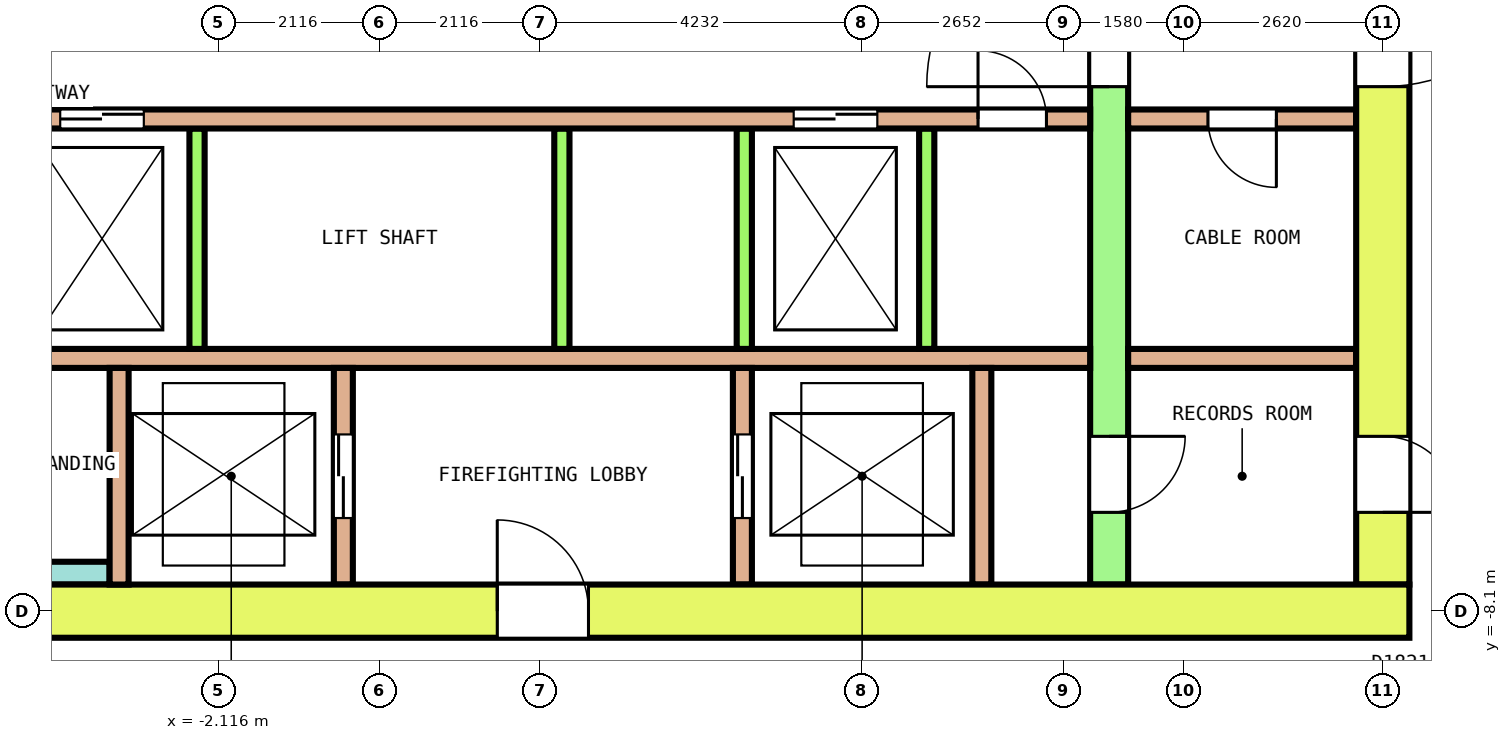
"""IFC4 building model, lengths in metres.
Left out: names, types, materials, properties, quantities, classifications, styles, units other than length and angle.
Written with IfcOpenShell. Run it as: python <this file> out.ifc"""

import sys

from ifc_helpers import new_model, si_unit, direction, frame, frame_2d, origin, place, context, subcontext, project, spatial, rectangle, extrude, element, fill, save


model = new_model("IFC4")
c1 = context("Model", 3, precision=1e-05, world=origin(), true_north=direction((0.0, 1.0)))
c2 = subcontext(c1, "Body", "Model", "MODEL_VIEW")
j1 = project(units=[si_unit("LENGTHUNIT", "METRE"), si_unit("PLANEANGLEUNIT", "RADIAN")], contexts=[c1])
p1 = place(None, origin())
s1 = spatial("IfcSite", under=j1, at=p1, CompositionType="ELEMENT")
p2 = place(p1, origin())
s2 = spatial("IfcBuilding", under=s1, at=p2, CompositionType="ELEMENT")
p3 = place(p2, frame((0.0, 0.0, 171.6)))
s3 = spatial("IfcBuildingStorey", under=s2, at=p3, CompositionType="ELEMENT", Elevation=171.6)
p4 = place(p3, frame((-13.55, -8.1, 0.0), z_axis=(0.0, 0.0, 1.0), x_axis=(1.0, 0.0, 0.0)))
e1 = element("IfcWall", 1, at=p4, inside=s3, PredefinedType="SHEAR", context=c2, shape_type="SweptSolid", body=[
    extrude(rectangle(XDim=27.1, YDim=0.7, at=frame_2d((13.55, 0.0))), origin(), (0.0, 0.0, 1.0), 4.1),
])
p5 = place(p4, frame((15.1, 0.0, 0.0)))
e2 = element("IfcOpeningElement", 2, at=p5, cuts=e1, PredefinedType="OPENING", context=c2, shape_type="SweptSolid", body=[
    extrude(rectangle(XDim=1.2, YDim=2.1, at=frame_2d((0.6, 1.05))), frame((0.0, 0.36, 0.0), z_axis=(0.0, -1.0, 0.0), x_axis=(1.0, 0.0, 0.0)), (0.0, 0.0, 1.0), 0.72),
])
p6 = place(p3, frame((13.2, -7.75, 0.0), z_axis=(0.0, 0.0, 1.0), x_axis=(0.0, 1.0, 0.0)))
e3 = element("IfcWall", 3, at=p6, inside=s3, PredefinedType="SHEAR", context=c2, shape_type="SweptSolid", body=[
    extrude(rectangle(XDim=15.5, YDim=0.7, at=frame_2d((7.75, 0.0))), origin(), (0.0, 0.0, 1.0), 4.1),
])
p7 = place(p6, frame((6.55, 0.0, 0.0)))
e4 = element("IfcOpeningElement", 4, at=p7, cuts=e3, PredefinedType="OPENING", context=c2, shape_type="SweptSolid", body=[
    extrude(rectangle(XDim=2.4, YDim=2.1, at=frame_2d((1.2, 1.05))), frame((0.0, 0.36, 0.0), z_axis=(0.0, -1.0, 0.0), x_axis=(1.0, 0.0, 0.0)), (0.0, 0.0, 1.0), 0.72),
])
p8 = place(p6, frame((13.45, 0.0, 0.0)))
e5 = element("IfcOpeningElement", 5, at=p8, cuts=e3, PredefinedType="OPENING", context=c2, shape_type="SweptSolid", body=[
    extrude(rectangle(XDim=1.2, YDim=2.1, at=frame_2d((0.6, 1.05))), frame((0.0, 0.36, 0.0), z_axis=(0.0, -1.0, 0.0), x_axis=(1.0, 0.0, 0.0)), (0.0, 0.0, 1.0), 0.72),
])
p9 = place(p6, frame((0.95, 0.0, 0.0)))
e6 = element("IfcOpeningElement", 6, at=p9, cuts=e3, PredefinedType="OPENING", context=c2, shape_type="SweptSolid", body=[
    extrude(rectangle(XDim=1.0, YDim=2.1, at=frame_2d((0.5, 1.05))), frame((0.0, 0.36, 0.0), z_axis=(0.0, -1.0, 0.0), x_axis=(1.0, 0.0, 0.0)), (0.0, 0.0, 1.0), 0.72),
])
p10 = place(p3, frame((9.6, -7.75, 0.0), z_axis=(0.0, 0.0, 1.0), x_axis=(0.0, 1.0, 0.0)))
e7 = element("IfcWall", 7, at=p10, inside=s3, PredefinedType="SHEAR", context=c2, shape_type="SweptSolid", body=[
    extrude(rectangle(XDim=15.5, YDim=0.5, at=frame_2d((7.75, 0.0))), origin(), (0.0, 0.0, 1.0), 4.1),
])
p11 = place(p10, frame((6.55, 0.0, 0.0)))
e8 = element("IfcOpeningElement", 8, at=p11, cuts=e7, PredefinedType="OPENING", context=c2, shape_type="SweptSolid", body=[
    extrude(rectangle(XDim=2.4, YDim=2.1, at=frame_2d((1.2, 1.05))), frame((0.0, 0.26, 0.0), z_axis=(0.0, -1.0, 0.0), x_axis=(1.0, 0.0, 0.0)), (0.0, 0.0, 1.0), 0.52),
])
p12 = place(p10, frame((13.45, 0.0, 0.0)))
e9 = element("IfcOpeningElement", 9, at=p12, cuts=e7, PredefinedType="OPENING", context=c2, shape_type="SweptSolid", body=[
    extrude(rectangle(XDim=1.2, YDim=2.1, at=frame_2d((0.6, 1.05))), frame((0.0, 0.26, 0.0), z_axis=(0.0, -1.0, 0.0), x_axis=(1.0, 0.0, 0.0)), (0.0, 0.0, 1.0), 0.52),
])
p13 = place(p10, frame((0.95, 0.0, 0.0)))
e10 = element("IfcOpeningElement", 10, at=p13, cuts=e7, PredefinedType="OPENING", context=c2, shape_type="SweptSolid", body=[
    extrude(rectangle(XDim=1.0, YDim=2.1, at=frame_2d((0.5, 1.05))), frame((0.0, 0.26, 0.0), z_axis=(0.0, -1.0, 0.0), x_axis=(1.0, 0.0, 0.0)), (0.0, 0.0, 1.0), 0.52),
])
p14 = place(p3, frame((-9.35, -1.625, 0.0), z_axis=(0.0, 0.0, 1.0), x_axis=(1.0, 0.0, 0.0)))
e11 = element("IfcWall", 11, at=p14, inside=s3, PredefinedType="SOLIDWALL", context=c2, shape_type="SweptSolid", body=[
    extrude(rectangle(XDim=18.7, YDim=0.25, at=frame_2d((9.35, 0.0))), origin(), (0.0, 0.0, 1.0), 4.1),
])
p15 = place(p14, frame((2.85, 0.0, 0.0)))
e12 = element("IfcOpeningElement", 12, at=p15, cuts=e11, PredefinedType="OPENING", context=c2, shape_type="SweptSolid", body=[
    extrude(rectangle(XDim=1.1, YDim=2.1, at=frame_2d((0.55, 1.05))), frame((0.0, 0.135, 0.0), z_axis=(0.0, -1.0, 0.0), x_axis=(1.0, 0.0, 0.0)), (0.0, 0.0, 1.0), 0.27),
])
p16 = place(p14, frame((5.15, 0.0, 0.0)))
e13 = element("IfcOpeningElement", 13, at=p16, cuts=e11, PredefinedType="OPENING", context=c2, shape_type="SweptSolid", body=[
    extrude(rectangle(XDim=1.1, YDim=2.1, at=frame_2d((0.55, 1.05))), frame((0.0, 0.135, 0.0), z_axis=(0.0, -1.0, 0.0), x_axis=(1.0, 0.0, 0.0)), (0.0, 0.0, 1.0), 0.27),
])
p17 = place(p14, frame((14.8, 0.0, 0.0)))
e14 = element("IfcOpeningElement", 14, at=p17, cuts=e11, PredefinedType="OPENING", context=c2, shape_type="SweptSolid", body=[
    extrude(rectangle(XDim=1.1, YDim=2.1, at=frame_2d((0.55, 1.05))), frame((0.0, 0.135, 0.0), z_axis=(0.0, -1.0, 0.0), x_axis=(1.0, 0.0, 0.0)), (0.0, 0.0, 1.0), 0.27),
])
p18 = place(p14, frame((0.575, 0.0, 0.0)))
e15 = element("IfcOpeningElement", 15, at=p18, cuts=e11, PredefinedType="OPENING", context=c2, shape_type="SweptSolid", body=[
    extrude(rectangle(XDim=0.9, YDim=2.1, at=frame_2d((0.45, 1.05))), frame((0.0, 0.135, 0.0), z_axis=(0.0, -1.0, 0.0), x_axis=(1.0, 0.0, 0.0)), (0.0, 0.0, 1.0), 0.27),
])
p19 = place(p14, frame((17.225, 0.0, 0.0)))
e16 = element("IfcOpeningElement", 16, at=p19, cuts=e11, PredefinedType="OPENING", context=c2, shape_type="SweptSolid", body=[
    extrude(rectangle(XDim=0.9, YDim=2.1, at=frame_2d((0.45, 1.05))), frame((0.0, 0.135, 0.0), z_axis=(0.0, -1.0, 0.0), x_axis=(1.0, 0.0, 0.0)), (0.0, 0.0, 1.0), 0.27),
])
p20 = place(p3, frame((9.85, -1.625, 0.0), z_axis=(0.0, 0.0, 1.0), x_axis=(1.0, 0.0, 0.0)))
e17 = element("IfcWall", 17, at=p20, inside=s3, PredefinedType="SOLIDWALL", context=c2, shape_type="SweptSolid", body=[
    extrude(rectangle(XDim=3.0, YDim=0.25, at=frame_2d((1.5, 0.0))), origin(), (0.0, 0.0, 1.0), 4.1),
])
p21 = place(p20, frame((1.05, 0.0, 0.0)))
e18 = element("IfcOpeningElement", 18, at=p21, cuts=e17, PredefinedType="OPENING", context=c2, shape_type="SweptSolid", body=[
    extrude(rectangle(XDim=0.9, YDim=2.1, at=frame_2d((0.45, 1.05))), frame((0.0, 0.135, 0.0), z_axis=(0.0, -1.0, 0.0), x_axis=(1.0, 0.0, 0.0)), (0.0, 0.0, 1.0), 0.27),
])
p22 = place(p3, frame((-9.35, -4.775, 0.0), z_axis=(0.0, 0.0, 1.0), x_axis=(1.0, 0.0, 0.0)))
e19 = element("IfcWall", 19, at=p22, inside=s3, PredefinedType="SOLIDWALL", context=c2, shape_type="SweptSolid", body=[
    extrude(rectangle(XDim=18.7, YDim=0.25, at=frame_2d((9.35, 0.0))), origin(), (0.0, 0.0, 1.0), 4.1),
])
p23 = place(p3, frame((9.85, -4.775, 0.0), z_axis=(0.0, 0.0, 1.0), x_axis=(1.0, 0.0, 0.0)))
e20 = element("IfcWall", 20, at=p23, inside=s3, PredefinedType="SOLIDWALL", context=c2, shape_type="SweptSolid", body=[
    extrude(rectangle(XDim=3.0, YDim=0.25, at=frame_2d((1.5, 0.0))), origin(), (0.0, 0.0, 1.0), 4.1),
])
for number, where, z_axis, x_axis in (
    (21, (-2.4, -4.65, 0.0), (0.0, 0.0, 1.0), (0.0, 1.0, 0.0)),
    (22, (2.4, -4.65, 0.0), (0.0, 0.0, 1.0), (0.0, 1.0, 0.0)),
    (23, (4.8, -4.65, 0.0), (0.0, 0.0, 1.0), (0.0, 1.0, 0.0)),
    (24, (7.2, -4.65, 0.0), (0.0, 0.0, 1.0), (0.0, 1.0, 0.0)),
):
    element("IfcWall", number, at=place(p3, frame(where, z_axis=z_axis, x_axis=x_axis)), inside=s3, PredefinedType="SOLIDWALL", context=c2, shape_type="SweptSolid", body=[
        extrude(rectangle(XDim=2.9, YDim=0.2, at=frame_2d((1.45, 0.0))), origin(), (0.0, 0.0, 1.0), 4.1),
    ])
p24 = place(p3, frame((-9.35, -7.6, 0.0), z_axis=(0.0, 0.0, 1.0), x_axis=(1.0, 0.0, 0.0)))
e25 = element("IfcWall", 25, at=p24, inside=s3, PredefinedType="SOLIDWALL", context=c2, shape_type="SweptSolid", body=[
    extrude(rectangle(XDim=5.8, YDim=0.3, at=frame_2d((2.9, 0.0))), origin(), (0.0, 0.0, 1.0), 4.1),
])
p25 = place(p3, frame((-3.425, -7.75, 0.0), z_axis=(0.0, 0.0, 1.0), x_axis=(0.0, 1.0, 0.0)))
e26 = element("IfcWall", 26, at=p25, inside=s3, PredefinedType="SOLIDWALL", context=c2, shape_type="SweptSolid", body=[
    extrude(rectangle(XDim=2.85, YDim=0.25, at=frame_2d((1.425, 0.0))), origin(), (0.0, 0.0, 1.0), 4.1),
])
p26 = place(p3, frame((-0.475, -7.75, 0.0), z_axis=(0.0, 0.0, 1.0), x_axis=(0.0, 1.0, 0.0)))
e27 = element("IfcWall", 27, at=p26, inside=s3, PredefinedType="SOLIDWALL", context=c2, shape_type="SweptSolid", body=[
    extrude(rectangle(XDim=2.85, YDim=0.25, at=frame_2d((1.425, 0.0))), origin(), (0.0, 0.0, 1.0), 4.1),
])
p27 = place(p26, frame((0.875, 0.0, 0.0)))
e28 = element("IfcOpeningElement", 28, at=p27, cuts=e27, PredefinedType="OPENING", context=c2, shape_type="SweptSolid", body=[
    extrude(rectangle(XDim=1.1, YDim=2.1, at=frame_2d((0.55, 1.05))), frame((0.0, 0.135, 0.0), z_axis=(0.0, -1.0, 0.0), x_axis=(1.0, 0.0, 0.0)), (0.0, 0.0, 1.0), 0.27),
])
p28 = place(p3, frame((4.775, -7.75, 0.0), z_axis=(0.0, 0.0, 1.0), x_axis=(0.0, 1.0, 0.0)))
e29 = element("IfcWall", 29, at=p28, inside=s3, PredefinedType="SOLIDWALL", context=c2, shape_type="SweptSolid", body=[
    extrude(rectangle(XDim=2.85, YDim=0.25, at=frame_2d((1.425, 0.0))), origin(), (0.0, 0.0, 1.0), 4.1),
])
p29 = place(p28, frame((0.875, 0.0, 0.0)))
e30 = element("IfcOpeningElement", 30, at=p29, cuts=e29, PredefinedType="OPENING", context=c2, shape_type="SweptSolid", body=[
    extrude(rectangle(XDim=1.1, YDim=2.1, at=frame_2d((0.55, 1.05))), frame((0.0, 0.135, 0.0), z_axis=(0.0, -1.0, 0.0), x_axis=(1.0, 0.0, 0.0)), (0.0, 0.0, 1.0), 0.27),
])
p30 = place(p3, frame((7.925, -7.75, 0.0), z_axis=(0.0, 0.0, 1.0), x_axis=(0.0, 1.0, 0.0)))
e31 = element("IfcWall", 31, at=p30, inside=s3, PredefinedType="SOLIDWALL", context=c2, shape_type="SweptSolid", body=[
    extrude(rectangle(XDim=2.85, YDim=0.25, at=frame_2d((1.425, 0.0))), origin(), (0.0, 0.0, 1.0), 4.1),
])
p31 = place(p16, origin())
e32 = element("IfcDoor", 32, at=p31, inside=s3, OperationType="DOUBLE_DOOR_SLIDING", PredefinedType="DOOR", context=c2, shape_type="SweptSolid", body=[
    extrude(rectangle(XDim=1.1, YDim=2.1, at=frame_2d((0.55, 1.05))), frame((0.0, 0.075, 0.0), z_axis=(0.0, -1.0, 0.0), x_axis=(1.0, 0.0, 0.0)), (0.0, 0.0, 1.0), 0.15),
])
fill(e13, e32)
p32 = place(p17, origin())
e33 = element("IfcDoor", 33, at=p32, inside=s3, OperationType="DOUBLE_DOOR_SLIDING", PredefinedType="DOOR", context=c2, shape_type="SweptSolid", body=[
    extrude(rectangle(XDim=1.1, YDim=2.1, at=frame_2d((0.55, 1.05))), frame((0.0, 0.075, 0.0), z_axis=(0.0, -1.0, 0.0), x_axis=(1.0, 0.0, 0.0)), (0.0, 0.0, 1.0), 0.15),
])
fill(e14, e33)
p33 = place(p27, origin())
e34 = element("IfcDoor", 34, at=p33, inside=s3, OperationType="DOUBLE_DOOR_SLIDING", PredefinedType="DOOR", context=c2, shape_type="SweptSolid", body=[
    extrude(rectangle(XDim=1.1, YDim=2.1, at=frame_2d((0.55, 1.05))), frame((0.0, 0.075, 0.0), z_axis=(0.0, -1.0, 0.0), x_axis=(1.0, 0.0, 0.0)), (0.0, 0.0, 1.0), 0.15),
])
fill(e28, e34)
p34 = place(p29, origin())
e35 = element("IfcDoor", 35, at=p34, inside=s3, OperationType="DOUBLE_DOOR_SLIDING", PredefinedType="DOOR", context=c2, shape_type="SweptSolid", body=[
    extrude(rectangle(XDim=1.1, YDim=2.1, at=frame_2d((0.55, 1.05))), frame((0.0, 0.075, 0.0), z_axis=(0.0, -1.0, 0.0), x_axis=(1.0, 0.0, 0.0)), (0.0, 0.0, 1.0), 0.15),
])
fill(e30, e35)
p35 = place(p11, origin())
e36 = element("IfcDoor", 36, at=p35, inside=s3, OperationType="DOUBLE_DOOR_SINGLE_SWING", PredefinedType="DOOR", context=c2, shape_type="SweptSolid", body=[
    extrude(rectangle(XDim=2.4, YDim=2.1, at=frame_2d((1.2, 1.05))), frame((0.0, 0.2, 0.0), z_axis=(0.0, -1.0, 0.0), x_axis=(1.0, 0.0, 0.0)), (0.0, 0.0, 1.0), 0.4),
])
fill(e8, e36)
p36 = place(p7, origin())
e37 = element("IfcDoor", 37, at=p36, inside=s3, OperationType="DOUBLE_DOOR_SINGLE_SWING", PredefinedType="DOOR", context=c2, shape_type="SweptSolid", body=[
    extrude(rectangle(XDim=2.4, YDim=2.1, at=frame_2d((1.2, 1.05))), frame((0.0, 0.3, 0.0), z_axis=(0.0, -1.0, 0.0), x_axis=(1.0, 0.0, 0.0)), (0.0, 0.0, 1.0), 0.6),
])
fill(e4, e37)
p37 = place(p5, origin())
e38 = element("IfcDoor", 38, at=p37, inside=s3, OperationType="SINGLE_SWING_LEFT", PredefinedType="DOOR", context=c2, shape_type="SweptSolid", body=[
    extrude(rectangle(XDim=1.2, YDim=2.1, at=frame_2d((0.6, 1.05))), frame((0.0, 0.3, 0.0), z_axis=(0.0, -1.0, 0.0), x_axis=(1.0, 0.0, 0.0)), (0.0, 0.0, 1.0), 0.6),
])
fill(e2, e38)
p38 = place(p13, origin())
e39 = element("IfcDoor", 39, at=p38, inside=s3, OperationType="SINGLE_SWING_LEFT", PredefinedType="DOOR", context=c2, shape_type="SweptSolid", body=[
    extrude(rectangle(XDim=1.0, YDim=2.1, at=frame_2d((0.5, 1.05))), frame((0.0, 0.2, 0.0), z_axis=(0.0, -1.0, 0.0), x_axis=(1.0, 0.0, 0.0)), (0.0, 0.0, 1.0), 0.4),
])
fill(e10, e39)
p39 = place(p9, origin())
e40 = element("IfcDoor", 40, at=p39, inside=s3, OperationType="SINGLE_SWING_RIGHT", PredefinedType="DOOR", context=c2, shape_type="SweptSolid", body=[
    extrude(rectangle(XDim=1.0, YDim=2.1, at=frame_2d((0.5, 1.05))), frame((0.0, 0.3, 0.0), z_axis=(0.0, -1.0, 0.0), x_axis=(1.0, 0.0, 0.0)), (0.0, 0.0, 1.0), 0.6),
])
fill(e6, e40)
p40 = place(p19, origin())
e41 = element("IfcDoor", 41, at=p40, inside=s3, OperationType="SINGLE_SWING_LEFT", PredefinedType="DOOR", context=c2, shape_type="SweptSolid", body=[
    extrude(rectangle(XDim=0.9, YDim=2.1, at=frame_2d((0.45, 1.05))), frame((0.0, 0.075, 0.0), z_axis=(0.0, -1.0, 0.0), x_axis=(1.0, 0.0, 0.0)), (0.0, 0.0, 1.0), 0.15),
])
fill(e16, e41)
p41 = place(p21, origin())
e42 = element("IfcDoor", 42, at=p41, inside=s3, OperationType="SINGLE_SWING_RIGHT", PredefinedType="DOOR", context=c2, shape_type="SweptSolid", body=[
    extrude(rectangle(XDim=0.9, YDim=2.1, at=frame_2d((0.45, 1.05))), frame((0.0, 0.075, 0.0), z_axis=(0.0, -1.0, 0.0), x_axis=(1.0, 0.0, 0.0)), (0.0, 0.0, 1.0), 0.15),
])
fill(e18, e42)
save(model, sys.argv[1])
